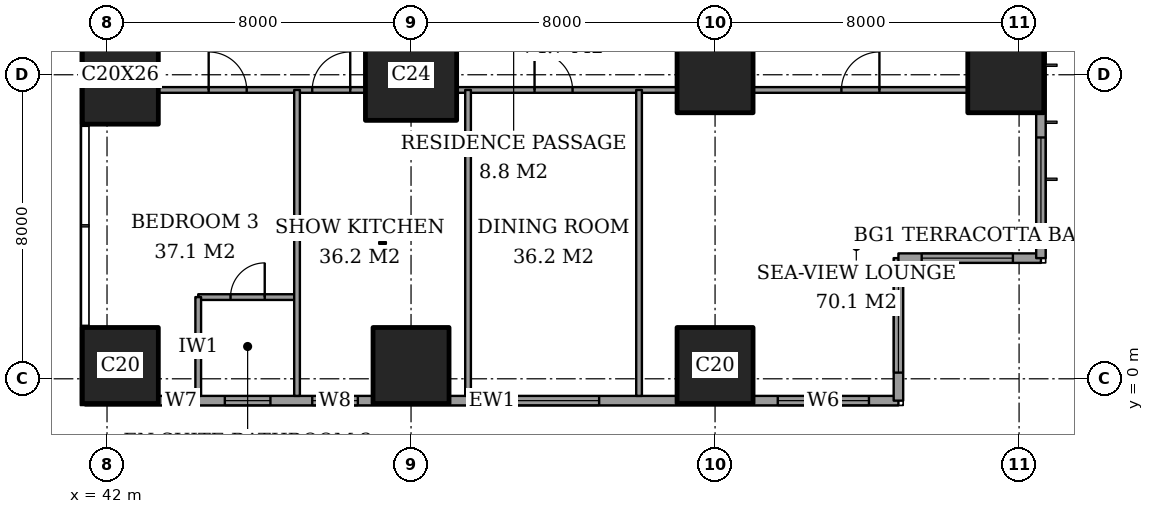
"""IFC4 building model, lengths in metres.
Left out: names, types, materials, properties, quantities, classifications, styles, units other than length and angle.
Written with IfcOpenShell. Run it as: python <this file> out.ifc"""

import sys

from ifc_helpers import new_model, si_unit, direction, frame, frame_2d, origin, origin_2d, place, context, subcontext, project, spatial, rectangle, extrude, element, fill, save


model = new_model("IFC4")
c1 = context("Model", 3, precision=1e-05, world=origin(), true_north=direction((0.0, 1.0)))
c2 = subcontext(c1, "Body", "Model", "MODEL_VIEW")
j1 = project(units=[si_unit("LENGTHUNIT", "METRE"), si_unit("PLANEANGLEUNIT", "RADIAN")], contexts=[c1])
p1 = place(None, origin())
s1 = spatial("IfcSite", under=j1, at=p1, CompositionType="ELEMENT")
p2 = place(p1, origin())
s2 = spatial("IfcBuilding", under=s1, at=p2, CompositionType="ELEMENT")
p3 = place(p2, frame((0.0, 0.0, 44.0)))
s3 = spatial("IfcBuildingStorey", under=s2, at=p3, CompositionType="ELEMENT", Elevation=44.0)
p4 = place(p3, frame((42.35, 0.35, 0.0), z_axis=(0.0, 0.0, 1.0), x_axis=(1.0, 0.0, 0.0)))
e1 = element("IfcColumn", 1, at=p4, inside=s3, PredefinedType="COLUMN", context=c2, shape_type="SweptSolid", body=[
    extrude(rectangle(XDim=2.0, YDim=2.0, at=origin_2d()), origin(), (0.0, 0.0, 1.0), 3.6),
])
p5 = place(p3, frame((42.35, 8.0, 0.0), z_axis=(0.0, 0.0, 1.0), x_axis=(1.0, 0.0, 0.0)))
e2 = element("IfcColumn", 2, at=p5, inside=s3, PredefinedType="COLUMN", context=c2, shape_type="SweptSolid", body=[
    extrude(rectangle(XDim=2.0, YDim=2.6, at=origin_2d()), origin(), (0.0, 0.0, 1.0), 3.6),
])
p6 = place(p3, frame((50.0, 0.35, 0.0), z_axis=(0.0, 0.0, 1.0), x_axis=(1.0, 0.0, 0.0)))
e3 = element("IfcColumn", 3, at=p6, inside=s3, PredefinedType="COLUMN", context=c2, shape_type="SweptSolid", body=[
    extrude(rectangle(XDim=2.0, YDim=2.0, at=origin_2d()), origin(), (0.0, 0.0, 1.0), 3.6),
])
p7 = place(p3, frame((50.0, 8.0, 0.0), z_axis=(0.0, 0.0, 1.0), x_axis=(1.0, 0.0, 0.0)))
e4 = element("IfcColumn", 4, at=p7, inside=s3, PredefinedType="COLUMN", context=c2, shape_type="SweptSolid", body=[
    extrude(rectangle(XDim=2.4, YDim=2.4, at=origin_2d()), origin(), (0.0, 0.0, 1.0), 3.6),
])
for number, where, z_axis, x_axis in (
    (5, (58.0, 0.35, 0.0), (0.0, 0.0, 1.0), (1.0, 0.0, 0.0)),
    (6, (58.0, 8.0, 0.0), (0.0, 0.0, 1.0), (1.0, 0.0, 0.0)),
    (7, (65.65, 8.0, 0.0), (0.0, 0.0, 1.0), (1.0, 0.0, 0.0)),
):
    element("IfcColumn", number, at=place(p3, frame(where, z_axis=z_axis, x_axis=x_axis)), inside=s3, PredefinedType="COLUMN", context=c2, shape_type="SweptSolid", body=[
        extrude(rectangle(XDim=2.0, YDim=2.0, at=origin_2d()), origin(), (0.0, 0.0, 1.0), 3.6),
    ])
p8 = place(p3, frame((41.425, -0.575, 0.0), z_axis=(0.0, 0.0, 1.0), x_axis=(1.0, 0.0, 0.0)))
e8 = element("IfcWall", 8, at=p8, inside=s3, PredefinedType="SOLIDWALL", context=c2, shape_type="SweptSolid", body=[
    extrude(rectangle(XDim=21.4, YDim=0.25, at=frame_2d((10.7, 0.0))), origin(), (0.0, 0.0, 1.0), 3.6),
])
p9 = place(p8, frame((2.225, 0.0, 0.6)))
e9 = element("IfcOpeningElement", 9, at=p9, cuts=e8, PredefinedType="OPENING", context=c2, shape_type="SweptSolid", body=[
    extrude(rectangle(XDim=0.6, YDim=2.0, at=frame_2d((0.3, 1.0))), frame((0.0, 0.135, 0.0), z_axis=(0.0, -1.0, 0.0), x_axis=(1.0, 0.0, 0.0)), (0.0, 0.0, 1.0), 0.27),
])
p10 = place(p8, frame((3.675, 0.0, 0.6)))
e10 = element("IfcOpeningElement", 10, at=p10, cuts=e8, PredefinedType="OPENING", context=c2, shape_type="SweptSolid", body=[
    extrude(rectangle(XDim=1.2, YDim=2.0, at=frame_2d((0.6, 1.0))), frame((0.0, 0.135, 0.0), z_axis=(0.0, -1.0, 0.0), x_axis=(1.0, 0.0, 0.0)), (0.0, 0.0, 1.0), 0.27),
])
p11 = place(p8, frame((5.975, 0.0, 0.6)))
e11 = element("IfcOpeningElement", 11, at=p11, cuts=e8, PredefinedType="OPENING", context=c2, shape_type="SweptSolid", body=[
    extrude(rectangle(XDim=1.2, YDim=2.0, at=frame_2d((0.6, 1.0))), frame((0.0, 0.135, 0.0), z_axis=(0.0, -1.0, 0.0), x_axis=(1.0, 0.0, 0.0)), (0.0, 0.0, 1.0), 0.27),
])
p12 = place(p8, frame((11.125, 0.0, 0.6)))
e12 = element("IfcOpeningElement", 12, at=p12, cuts=e8, PredefinedType="OPENING", context=c2, shape_type="SweptSolid", body=[
    extrude(rectangle(XDim=2.4, YDim=2.0, at=frame_2d((1.2, 1.0))), frame((0.0, 0.135, 0.0), z_axis=(0.0, -1.0, 0.0), x_axis=(1.0, 0.0, 0.0)), (0.0, 0.0, 1.0), 0.27),
])
p13 = place(p8, frame((18.225, 0.0, 0.6)))
e13 = element("IfcOpeningElement", 13, at=p13, cuts=e8, PredefinedType="OPENING", context=c2, shape_type="SweptSolid", body=[
    extrude(rectangle(XDim=2.4, YDim=2.0, at=frame_2d((1.2, 1.0))), frame((0.0, 0.135, 0.0), z_axis=(0.0, -1.0, 0.0), x_axis=(1.0, 0.0, 0.0)), (0.0, 0.0, 1.0), 0.27),
])
p14 = place(p3, frame((62.825, -0.575, 0.0), z_axis=(0.0, 0.0, 1.0), x_axis=(0.0, 1.0, 0.0)))
e14 = element("IfcWall", 14, at=p14, inside=s3, PredefinedType="SOLIDWALL", context=c2, shape_type="SweptSolid", body=[
    extrude(rectangle(XDim=3.75, YDim=0.25, at=frame_2d((1.875, 0.0))), origin(), (0.0, 0.0, 1.0), 3.6),
])
p15 = place(p14, frame((0.738, 0.0, 0.6)))
e15 = element("IfcOpeningElement", 15, at=p15, cuts=e14, PredefinedType="OPENING", context=c2, shape_type="SweptSolid", body=[
    extrude(rectangle(XDim=2.4, YDim=2.0, at=frame_2d((1.2, 1.0))), frame((0.0, 0.135, 0.0), z_axis=(0.0, -1.0, 0.0), x_axis=(1.0, 0.0, 0.0)), (0.0, 0.0, 1.0), 0.27),
])
p16 = place(p3, frame((62.825, 3.175, 0.0), z_axis=(0.0, 0.0, 1.0), x_axis=(1.0, 0.0, 0.0)))
e16 = element("IfcWall", 16, at=p16, inside=s3, PredefinedType="SOLIDWALL", context=c2, shape_type="SweptSolid", body=[
    extrude(rectangle(XDim=3.75, YDim=0.25, at=frame_2d((1.875, 0.0))), origin(), (0.0, 0.0, 1.0), 3.6),
])
p17 = place(p16, frame((0.613, 0.0, 0.6)))
e17 = element("IfcOpeningElement", 17, at=p17, cuts=e16, PredefinedType="OPENING", context=c2, shape_type="SweptSolid", body=[
    extrude(rectangle(XDim=2.4, YDim=2.0, at=frame_2d((1.2, 1.0))), frame((0.0, 0.135, 0.0), z_axis=(0.0, -1.0, 0.0), x_axis=(1.0, 0.0, 0.0)), (0.0, 0.0, 1.0), 0.27),
])
p18 = place(p3, frame((66.575, 3.175, 0.0), z_axis=(0.0, 0.0, 1.0), x_axis=(0.0, 1.0, 0.0)))
e18 = element("IfcWall", 18, at=p18, inside=s3, PredefinedType="SOLIDWALL", context=c2, shape_type="SweptSolid", body=[
    extrude(rectangle(XDim=41.65, YDim=0.25, at=frame_2d((20.825, 0.0))), origin(), (0.0, 0.0, 1.0), 3.6),
])
p19 = place(p18, frame((0.775, 0.0, 0.6)))
e19 = element("IfcOpeningElement", 19, at=p19, cuts=e18, PredefinedType="OPENING", context=c2, shape_type="SweptSolid", body=[
    extrude(rectangle(XDim=2.4, YDim=2.0, at=frame_2d((1.2, 1.0))), frame((0.0, 0.135, 0.0), z_axis=(0.0, -1.0, 0.0), x_axis=(1.0, 0.0, 0.0)), (0.0, 0.0, 1.0), 0.27),
])
p20 = place(p18, frame((6.1, 0.0, 0.6)))
e20 = element("IfcOpeningElement", 20, at=p20, cuts=e18, PredefinedType="OPENING", context=c2, shape_type="SweptSolid", body=[
    extrude(rectangle(XDim=1.2, YDim=2.0, at=frame_2d((0.6, 1.0))), frame((0.0, 0.135, 0.0), z_axis=(0.0, -1.0, 0.0), x_axis=(1.0, 0.0, 0.0)), (0.0, 0.0, 1.0), 0.27),
])
p21 = place(p18, frame((8.275, 0.0, 0.6)))
e21 = element("IfcOpeningElement", 21, at=p21, cuts=e18, PredefinedType="OPENING", context=c2, shape_type="SweptSolid", body=[
    extrude(rectangle(XDim=2.4, YDim=2.0, at=frame_2d((1.2, 1.0))), frame((0.0, 0.135, 0.0), z_axis=(0.0, -1.0, 0.0), x_axis=(1.0, 0.0, 0.0)), (0.0, 0.0, 1.0), 0.27),
])
p22 = place(p18, frame((15.775, 0.0, 0.6)))
e22 = element("IfcOpeningElement", 22, at=p22, cuts=e18, PredefinedType="OPENING", context=c2, shape_type="SweptSolid", body=[
    extrude(rectangle(XDim=2.4, YDim=2.0, at=frame_2d((1.2, 1.0))), frame((0.0, 0.135, 0.0), z_axis=(0.0, -1.0, 0.0), x_axis=(1.0, 0.0, 0.0)), (0.0, 0.0, 1.0), 0.27),
])
p23 = place(p18, frame((23.475, 0.0, 0.6)))
e23 = element("IfcOpeningElement", 23, at=p23, cuts=e18, PredefinedType="OPENING", context=c2, shape_type="SweptSolid", body=[
    extrude(rectangle(XDim=2.4, YDim=2.0, at=frame_2d((1.2, 1.0))), frame((0.0, 0.135, 0.0), z_axis=(0.0, -1.0, 0.0), x_axis=(1.0, 0.0, 0.0)), (0.0, 0.0, 1.0), 0.27),
])
p24 = place(p18, frame((30.975, 0.0, 0.6)))
e24 = element("IfcOpeningElement", 24, at=p24, cuts=e18, PredefinedType="OPENING", context=c2, shape_type="SweptSolid", body=[
    extrude(rectangle(XDim=2.4, YDim=2.0, at=frame_2d((1.2, 1.0))), frame((0.0, 0.135, 0.0), z_axis=(0.0, -1.0, 0.0), x_axis=(1.0, 0.0, 0.0)), (0.0, 0.0, 1.0), 0.27),
])
p25 = place(p18, frame((34.5, 0.0, 0.6)))
e25 = element("IfcOpeningElement", 25, at=p25, cuts=e18, PredefinedType="OPENING", context=c2, shape_type="SweptSolid", body=[
    extrude(rectangle(XDim=1.2, YDim=2.0, at=frame_2d((0.6, 1.0))), frame((0.0, 0.135, 0.0), z_axis=(0.0, -1.0, 0.0), x_axis=(1.0, 0.0, 0.0)), (0.0, 0.0, 1.0), 0.27),
])
p26 = place(p18, frame((38.475, 0.0, 0.6)))
e26 = element("IfcOpeningElement", 26, at=p26, cuts=e18, PredefinedType="OPENING", context=c2, shape_type="SweptSolid", body=[
    extrude(rectangle(XDim=2.4, YDim=2.0, at=frame_2d((1.2, 1.0))), frame((0.0, 0.135, 0.0), z_axis=(0.0, -1.0, 0.0), x_axis=(1.0, 0.0, 0.0)), (0.0, 0.0, 1.0), 0.27),
])
p27 = place(p3, frame((44.4, 2.15, 0.0), z_axis=(0.0, 0.0, 1.0), x_axis=(1.0, 0.0, 0.0)))
e27 = element("IfcWall", 27, at=p27, inside=s3, PredefinedType="PARTITIONING", context=c2, shape_type="SweptSolid", body=[
    extrude(rectangle(XDim=2.6, YDim=0.15, at=frame_2d((1.3, 0.0))), origin(), (0.0, 0.0, 1.0), 3.35),
])
p28 = place(p27, frame((0.85, 0.0, 0.0)))
e28 = element("IfcOpeningElement", 28, at=p28, cuts=e27, PredefinedType="OPENING", context=c2, shape_type="SweptSolid", body=[
    extrude(rectangle(XDim=0.9, YDim=2.1, at=frame_2d((0.45, 1.05))), frame((0.0, 0.085, 0.0), z_axis=(0.0, -1.0, 0.0), x_axis=(1.0, 0.0, 0.0)), (0.0, 0.0, 1.0), 0.17),
])
p29 = place(p3, frame((43.35, 7.6, 0.0), z_axis=(0.0, 0.0, 1.0), x_axis=(1.0, 0.0, 0.0)))
e29 = element("IfcWall", 29, at=p29, inside=s3, PredefinedType="PARTITIONING", context=c2, shape_type="SweptSolid", body=[
    extrude(rectangle(XDim=5.45, YDim=0.15, at=frame_2d((2.725, 0.0))), origin(), (0.0, 0.0, 1.0), 3.35),
])
p30 = place(p29, frame((4.05, 0.0, 0.0)))
e30 = element("IfcOpeningElement", 30, at=p30, cuts=e29, PredefinedType="OPENING", context=c2, shape_type="SweptSolid", body=[
    extrude(rectangle(XDim=1.0, YDim=2.1, at=frame_2d((0.5, 1.05))), frame((0.0, 0.085, 0.0), z_axis=(0.0, -1.0, 0.0), x_axis=(1.0, 0.0, 0.0)), (0.0, 0.0, 1.0), 0.17),
])
p31 = place(p29, frame((1.325, 0.0, 0.0)))
e31 = element("IfcOpeningElement", 31, at=p31, cuts=e29, PredefinedType="OPENING", context=c2, shape_type="SweptSolid", body=[
    extrude(rectangle(XDim=1.0, YDim=2.1, at=frame_2d((0.5, 1.05))), frame((0.0, 0.085, 0.0), z_axis=(0.0, -1.0, 0.0), x_axis=(1.0, 0.0, 0.0)), (0.0, 0.0, 1.0), 0.17),
])
p32 = place(p3, frame((51.2, 7.6, 0.0), z_axis=(0.0, 0.0, 1.0), x_axis=(1.0, 0.0, 0.0)))
e32 = element("IfcWall", 32, at=p32, inside=s3, PredefinedType="PARTITIONING", context=c2, shape_type="SweptSolid", body=[
    extrude(rectangle(XDim=5.8, YDim=0.15, at=frame_2d((2.9, 0.0))), origin(), (0.0, 0.0, 1.0), 3.35),
])
p33 = place(p32, frame((2.05, 0.0, 0.0)))
e33 = element("IfcOpeningElement", 33, at=p33, cuts=e32, PredefinedType="OPENING", context=c2, shape_type="SweptSolid", body=[
    extrude(rectangle(XDim=1.0, YDim=2.1, at=frame_2d((0.5, 1.05))), frame((0.0, 0.085, 0.0), z_axis=(0.0, -1.0, 0.0), x_axis=(1.0, 0.0, 0.0)), (0.0, 0.0, 1.0), 0.17),
])
p34 = place(p3, frame((59.0, 7.6, 0.0), z_axis=(0.0, 0.0, 1.0), x_axis=(1.0, 0.0, 0.0)))
e34 = element("IfcWall", 34, at=p34, inside=s3, PredefinedType="PARTITIONING", context=c2, shape_type="SweptSolid", body=[
    extrude(rectangle(XDim=5.65, YDim=0.15, at=frame_2d((2.825, 0.0))), origin(), (0.0, 0.0, 1.0), 3.35),
])
p35 = place(p34, frame((2.325, 0.0, 0.0)))
e35 = element("IfcOpeningElement", 35, at=p35, cuts=e34, PredefinedType="OPENING", context=c2, shape_type="SweptSolid", body=[
    extrude(rectangle(XDim=1.0, YDim=2.1, at=frame_2d((0.5, 1.05))), frame((0.0, 0.085, 0.0), z_axis=(0.0, -1.0, 0.0), x_axis=(1.0, 0.0, 0.0)), (0.0, 0.0, 1.0), 0.17),
])
p36 = place(p3, frame((44.4, -0.45, 0.0), z_axis=(0.0, 0.0, 1.0), x_axis=(0.0, 1.0, 0.0)))
e36 = element("IfcWall", 36, at=p36, inside=s3, PredefinedType="PARTITIONING", context=c2, shape_type="SweptSolid", body=[
    extrude(rectangle(XDim=2.6, YDim=0.15, at=frame_2d((1.3, 0.0))), origin(), (0.0, 0.0, 1.0), 3.35),
])
for number, where, z_axis, x_axis in (
    (37, (47.0, -0.45, 0.0), (0.0, 0.0, 1.0), (0.0, 1.0, 0.0)),
    (38, (51.5, -0.45, 0.0), (0.0, 0.0, 1.0), (0.0, 1.0, 0.0)),
    (39, (56.0, -0.45, 0.0), (0.0, 0.0, 1.0), (0.0, 1.0, 0.0)),
):
    element("IfcWall", number, at=place(p3, frame(where, z_axis=z_axis, x_axis=x_axis)), inside=s3, PredefinedType="PARTITIONING", context=c2, shape_type="SweptSolid", body=[
        extrude(rectangle(XDim=8.05, YDim=0.15, at=frame_2d((4.025, 0.0))), origin(), (0.0, 0.0, 1.0), 3.35),
    ])
p37 = place(p9, origin())
e40 = element("IfcWindow", 40, at=p37, inside=s3, PartitioningType="SINGLE_PANEL", PredefinedType="WINDOW", context=c2, shape_type="SweptSolid", body=[
    extrude(rectangle(XDim=0.6, YDim=2.0, at=frame_2d((0.3, 1.0))), frame((0.0, 0.03, 0.0), z_axis=(0.0, -1.0, 0.0), x_axis=(1.0, 0.0, 0.0)), (0.0, 0.0, 1.0), 0.06),
])
fill(e9, e40)
p38 = place(p10, origin())
e41 = element("IfcWindow", 41, at=p38, inside=s3, PartitioningType="SINGLE_PANEL", PredefinedType="WINDOW", context=c2, shape_type="SweptSolid", body=[
    extrude(rectangle(XDim=1.2, YDim=2.0, at=frame_2d((0.6, 1.0))), frame((0.0, 0.03, 0.0), z_axis=(0.0, -1.0, 0.0), x_axis=(1.0, 0.0, 0.0)), (0.0, 0.0, 1.0), 0.06),
])
fill(e10, e41)
p39 = place(p11, origin())
e42 = element("IfcWindow", 42, at=p39, inside=s3, PartitioningType="SINGLE_PANEL", PredefinedType="WINDOW", context=c2, shape_type="SweptSolid", body=[
    extrude(rectangle(XDim=1.2, YDim=2.0, at=frame_2d((0.6, 1.0))), frame((0.0, 0.03, 0.0), z_axis=(0.0, -1.0, 0.0), x_axis=(1.0, 0.0, 0.0)), (0.0, 0.0, 1.0), 0.06),
])
fill(e11, e42)
p40 = place(p12, origin())
e43 = element("IfcWindow", 43, at=p40, inside=s3, PartitioningType="SINGLE_PANEL", PredefinedType="WINDOW", context=c2, shape_type="SweptSolid", body=[
    extrude(rectangle(XDim=2.4, YDim=2.0, at=frame_2d((1.2, 1.0))), frame((0.0, 0.03, 0.0), z_axis=(0.0, -1.0, 0.0), x_axis=(1.0, 0.0, 0.0)), (0.0, 0.0, 1.0), 0.06),
])
fill(e12, e43)
p41 = place(p13, origin())
e44 = element("IfcWindow", 44, at=p41, inside=s3, PartitioningType="SINGLE_PANEL", PredefinedType="WINDOW", context=c2, shape_type="SweptSolid", body=[
    extrude(rectangle(XDim=2.4, YDim=2.0, at=frame_2d((1.2, 1.0))), frame((0.0, 0.03, 0.0), z_axis=(0.0, -1.0, 0.0), x_axis=(1.0, 0.0, 0.0)), (0.0, 0.0, 1.0), 0.06),
])
fill(e13, e44)
p42 = place(p15, origin())
e45 = element("IfcWindow", 45, at=p42, inside=s3, PartitioningType="SINGLE_PANEL", PredefinedType="WINDOW", context=c2, shape_type="SweptSolid", body=[
    extrude(rectangle(XDim=2.4, YDim=2.0, at=frame_2d((1.2, 1.0))), frame((0.0, 0.03, 0.0), z_axis=(0.0, -1.0, 0.0), x_axis=(1.0, 0.0, 0.0)), (0.0, 0.0, 1.0), 0.06),
])
fill(e15, e45)
p43 = place(p17, origin())
e46 = element("IfcWindow", 46, at=p43, inside=s3, PartitioningType="SINGLE_PANEL", PredefinedType="WINDOW", context=c2, shape_type="SweptSolid", body=[
    extrude(rectangle(XDim=2.4, YDim=2.0, at=frame_2d((1.2, 1.0))), frame((0.0, 0.03, 0.0), z_axis=(0.0, -1.0, 0.0), x_axis=(1.0, 0.0, 0.0)), (0.0, 0.0, 1.0), 0.06),
])
fill(e17, e46)
p44 = place(p19, origin())
e47 = element("IfcWindow", 47, at=p44, inside=s3, PartitioningType="SINGLE_PANEL", PredefinedType="WINDOW", context=c2, shape_type="SweptSolid", body=[
    extrude(rectangle(XDim=2.4, YDim=2.0, at=frame_2d((1.2, 1.0))), frame((0.0, 0.03, 0.0), z_axis=(0.0, -1.0, 0.0), x_axis=(1.0, 0.0, 0.0)), (0.0, 0.0, 1.0), 0.06),
])
fill(e19, e47)
p45 = place(p35, origin())
e48 = element("IfcDoor", 48, at=p45, inside=s3, OperationType="SINGLE_SWING_LEFT", PredefinedType="DOOR", context=c2, shape_type="SweptSolid", body=[
    extrude(rectangle(XDim=1.0, YDim=2.1, at=frame_2d((0.5, 1.05))), frame((0.0, 0.025, 0.0), z_axis=(0.0, -1.0, 0.0), x_axis=(1.0, 0.0, 0.0)), (0.0, 0.0, 1.0), 0.05),
])
fill(e35, e48)
p46 = place(p33, origin())
e49 = element("IfcDoor", 49, at=p46, inside=s3, OperationType="SINGLE_SWING_RIGHT", PredefinedType="DOOR", context=c2, shape_type="SweptSolid", body=[
    extrude(rectangle(XDim=1.0, YDim=2.1, at=frame_2d((0.5, 1.05))), frame((0.0, 0.025, 0.0), z_axis=(0.0, -1.0, 0.0), x_axis=(1.0, 0.0, 0.0)), (0.0, 0.0, 1.0), 0.05),
])
fill(e33, e49)
p47 = place(p30, origin())
e50 = element("IfcDoor", 50, at=p47, inside=s3, OperationType="SINGLE_SWING_LEFT", PredefinedType="DOOR", context=c2, shape_type="SweptSolid", body=[
    extrude(rectangle(XDim=1.0, YDim=2.1, at=frame_2d((0.5, 1.05))), frame((0.0, 0.025, 0.0), z_axis=(0.0, -1.0, 0.0), x_axis=(1.0, 0.0, 0.0)), (0.0, 0.0, 1.0), 0.05),
])
fill(e30, e50)
p48 = place(p28, origin())
e51 = element("IfcDoor", 51, at=p48, inside=s3, OperationType="SINGLE_SWING_LEFT", PredefinedType="DOOR", context=c2, shape_type="SweptSolid", body=[
    extrude(rectangle(XDim=0.9, YDim=2.1, at=frame_2d((0.45, 1.05))), frame((0.0, 0.025, 0.0), z_axis=(0.0, -1.0, 0.0), x_axis=(1.0, 0.0, 0.0)), (0.0, 0.0, 1.0), 0.05),
])
fill(e28, e51)
p49 = place(p31, origin())
e52 = element("IfcDoor", 52, at=p49, inside=s3, OperationType="SINGLE_SWING_RIGHT", PredefinedType="DOOR", context=c2, shape_type="SweptSolid", body=[
    extrude(rectangle(XDim=1.0, YDim=2.1, at=frame_2d((0.5, 1.05))), frame((0.0, 0.025, 0.0), z_axis=(0.0, -1.0, 0.0), x_axis=(1.0, 0.0, 0.0)), (0.0, 0.0, 1.0), 0.05),
])
fill(e31, e52)
save(model, sys.argv[1])
